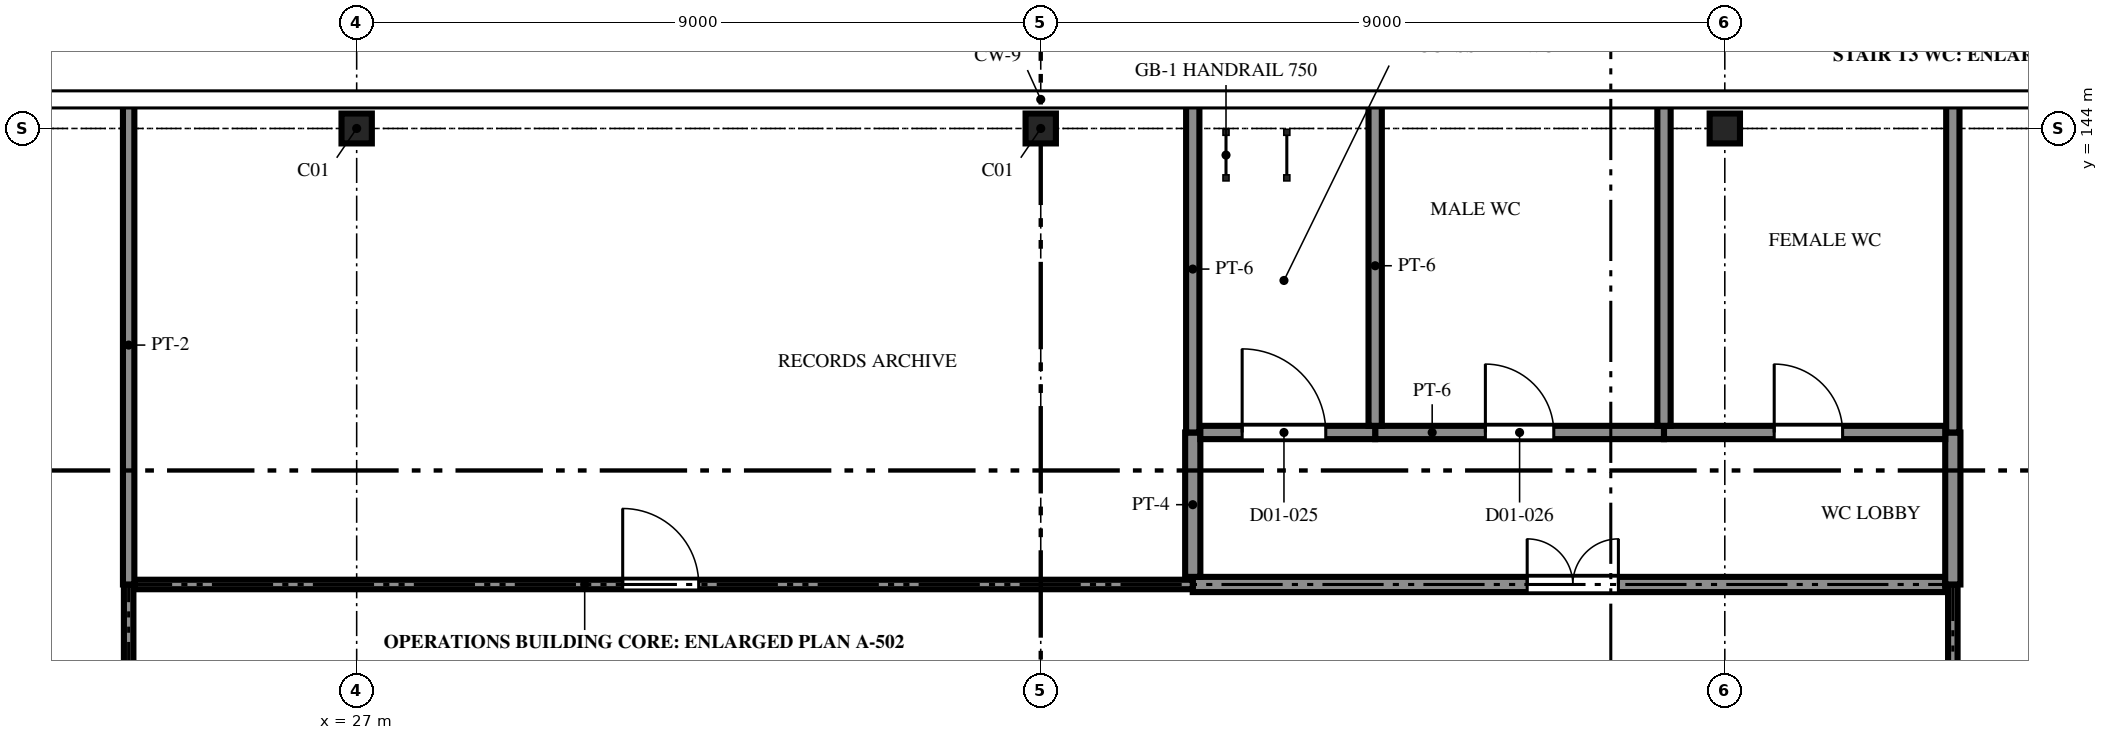
"""IFC4 building model, lengths in metres.
Left out: names, types, materials, properties, quantities, classifications, styles, units other than length and angle.
Written with IfcOpenShell. Run it as: python <this file> out.ifc"""

import sys

from ifc_helpers import new_model, si_unit, direction, frame, frame_2d, origin, origin_2d, place, context, subcontext, project, spatial, polyline, rectangle, i_section, outline, extrude, element, fill, save


model = new_model("IFC4")
c1 = context("Model", 3, precision=1e-05, world=origin(), true_north=direction((0.0, 1.0)))
c2 = subcontext(c1, "Body", "Model", "MODEL_VIEW")
j1 = project(units=[si_unit("LENGTHUNIT", "METRE"), si_unit("PLANEANGLEUNIT", "RADIAN")], contexts=[c1])
p1 = place(None, origin())
s1 = spatial("IfcSite", under=j1, at=p1, CompositionType="ELEMENT")
p2 = place(p1, origin())
s2 = spatial("IfcBuilding", under=s1, at=p2, CompositionType="ELEMENT")
p3 = place(p2, frame((0.0, 0.0, 7.5)))
s3 = spatial("IfcBuildingStorey", under=s2, at=p3, CompositionType="ELEMENT", Elevation=7.5)
for number, where, z_axis, x_axis in (
    (1, (27.0, 144.0, 0.0), (0.0, 0.0, 1.0), (1.0, 0.0, 0.0)),
    (2, (36.0, 144.0, 0.0), (0.0, 0.0, 1.0), (1.0, 0.0, 0.0)),
    (3, (45.0, 144.0, 0.0), (0.0, 0.0, 1.0), (1.0, 0.0, 0.0)),
):
    element("IfcColumn", number, at=place(p3, frame(where, z_axis=z_axis, x_axis=x_axis)), inside=s3, PredefinedType="COLUMN", context=c2, shape_type="SweptSolid", body=[
        extrude(i_section(OverallWidth=0.399, OverallDepth=0.394, WebThickness=0.016, FlangeThickness=0.025, FilletRadius=0.015, at=origin_2d()), origin(), (0.0, 0.0, 1.0), 4.2),
    ])
p4 = place(p3, frame((38.0, 138.0, 0.0), z_axis=(0.0, 0.0, 1.0), x_axis=(1.0, 0.0, 0.0)))
e4 = element("IfcWall", 4, at=p4, inside=s3, PredefinedType="PARTITIONING", context=c2, shape_type="SweptSolid", body=[
    extrude(rectangle(XDim=9.9, YDim=0.2, at=frame_2d((4.95, 0.0))), origin(), (0.0, 0.0, 1.0), 3.382),
])
p5 = place(p4, frame((4.4, 0.0, 0.0)))
e5 = element("IfcOpeningElement", 5, at=p5, cuts=e4, PredefinedType="OPENING", context=c2, shape_type="SweptSolid", body=[
    extrude(rectangle(XDim=1.2, YDim=2.1, at=frame_2d((0.6, 1.05))), frame((0.0, 0.11, 0.0), z_axis=(0.0, -1.0, 0.0), x_axis=(1.0, 0.0, 0.0)), (0.0, 0.0, 1.0), 0.22),
])
for number, where, z_axis, x_axis in (
    (6, (48.0, 138.0, 0.0), (0.0, 0.0, 1.0), (0.0, -1.0, 0.0)),
    (7, (24.0, 135.062, 0.0), (0.0, 0.0, 1.0), (0.0, 1.0, 0.0)),
):
    element("IfcWall", number, at=place(p3, frame(where, z_axis=z_axis, x_axis=x_axis)), inside=s3, PredefinedType="PARTITIONING", context=c2, shape_type="SweptSolid", body=[
        extrude(rectangle(XDim=2.938, YDim=0.125, at=frame_2d((1.469, 0.0))), origin(), (0.0, 0.0, 1.0), 3.307),
    ])
p6 = place(p3, frame((24.075, 138.0, 0.0), z_axis=(0.0, 0.0, 1.0), x_axis=(1.0, 0.0, 0.0)))
e8 = element("IfcWall", 8, at=p6, inside=s3, PredefinedType="PARTITIONING", context=c2, shape_type="SweptSolid", body=[
    extrude(rectangle(XDim=13.925, YDim=0.125, at=frame_2d((6.962, 0.0))), origin(), (0.0, 0.0, 1.0), 3.307),
])
p7 = place(p6, frame((6.425, 0.0, 0.0)))
e9 = element("IfcOpeningElement", 9, at=p7, cuts=e8, PredefinedType="OPENING", context=c2, shape_type="SweptSolid", body=[
    extrude(rectangle(XDim=1.0, YDim=2.1, at=frame_2d((0.5, 1.05))), frame((0.0, 0.073, 0.0), z_axis=(0.0, -1.0, 0.0), x_axis=(1.0, 0.0, 0.0)), (0.0, 0.0, 1.0), 0.145),
])
p8 = place(p3, frame((48.0, 140.0, 0.0), z_axis=(0.0, 0.0, 1.0), x_axis=(0.0, -1.0, 0.0)))
e10 = element("IfcWall", 10, at=p8, inside=s3, PredefinedType="PARTITIONING", context=c2, shape_type="SweptSolid", body=[
    extrude(rectangle(XDim=2.0, YDim=0.2, at=frame_2d((1.0, 0.0))), origin(), (0.0, 0.0, 1.0), 3.382),
])
p9 = place(p3, frame((38.0, 138.1, 0.0), z_axis=(0.0, 0.0, 1.0), x_axis=(0.0, 1.0, 0.0)))
e11 = element("IfcWall", 11, at=p9, inside=s3, PredefinedType="PARTITIONING", context=c2, shape_type="SweptSolid", body=[
    extrude(rectangle(XDim=1.9, YDim=0.2, at=frame_2d((0.95, 0.0))), origin(), (0.0, 0.0, 1.0), 3.382),
])
p10 = place(p3, frame((40.4, 140.0, 0.0), z_axis=(0.0, 0.0, 1.0), x_axis=(1.0, 0.0, 0.0)))
e12 = element("IfcWall", 12, at=p10, inside=s3, PredefinedType="PARTITIONING", context=c2, shape_type="SweptSolid", body=[
    extrude(rectangle(XDim=3.8, YDim=0.175, at=frame_2d((1.9, 0.0))), origin(), (0.0, 0.0, 1.0), 3.307),
])
p11 = place(p10, frame((1.45, 0.0, 0.0)))
e13 = element("IfcOpeningElement", 13, at=p11, cuts=e12, PredefinedType="OPENING", context=c2, shape_type="SweptSolid", body=[
    extrude(rectangle(XDim=0.9, YDim=2.1, at=frame_2d((0.45, 1.05))), frame((0.0, 0.097, 0.0), z_axis=(0.0, -1.0, 0.0), x_axis=(1.0, 0.0, 0.0)), (0.0, 0.0, 1.0), 0.195),
])
p12 = place(p3, frame((44.2, 140.0, 0.0), z_axis=(0.0, 0.0, 1.0), x_axis=(1.0, 0.0, 0.0)))
e14 = element("IfcWall", 14, at=p12, inside=s3, PredefinedType="PARTITIONING", context=c2, shape_type="SweptSolid", body=[
    extrude(rectangle(XDim=3.7, YDim=0.175, at=frame_2d((1.85, 0.0))), origin(), (0.0, 0.0, 1.0), 3.307),
])
p13 = place(p12, frame((1.45, 0.0, 0.0)))
e15 = element("IfcOpeningElement", 15, at=p13, cuts=e14, PredefinedType="OPENING", context=c2, shape_type="SweptSolid", body=[
    extrude(rectangle(XDim=0.9, YDim=2.1, at=frame_2d((0.45, 1.05))), frame((0.0, 0.097, 0.0), z_axis=(0.0, -1.0, 0.0), x_axis=(1.0, 0.0, 0.0)), (0.0, 0.0, 1.0), 0.195),
])
p14 = place(p3, frame((38.1, 140.0, 0.0), z_axis=(0.0, 0.0, 1.0), x_axis=(1.0, 0.0, 0.0)))
e16 = element("IfcWall", 16, at=p14, inside=s3, PredefinedType="PARTITIONING", context=c2, shape_type="SweptSolid", body=[
    extrude(rectangle(XDim=2.3, YDim=0.175, at=frame_2d((1.15, 0.0))), origin(), (0.0, 0.0, 1.0), 3.307),
])
p15 = place(p14, frame((0.55, 0.0, 0.0)))
e17 = element("IfcOpeningElement", 17, at=p15, cuts=e16, PredefinedType="OPENING", context=c2, shape_type="SweptSolid", body=[
    extrude(rectangle(XDim=1.1, YDim=2.1, at=frame_2d((0.55, 1.05))), frame((0.0, 0.097, 0.0), z_axis=(0.0, -1.0, 0.0), x_axis=(1.0, 0.0, 0.0)), (0.0, 0.0, 1.0), 0.195),
])
p16 = place(p3, frame((38.0, 140.0, 0.0), z_axis=(0.0, 0.0, 1.0), x_axis=(0.0, 1.0, 0.0)))
e18 = element("IfcWall", 18, at=p16, inside=s3, PredefinedType="PARTITIONING", context=c2, shape_type="SweptSolid", body=[
    extrude(rectangle(XDim=4.3, YDim=0.175, at=frame_2d((2.15, 0.0))), origin(), (0.0, 0.0, 1.0), 3.307),
])
for number, where, z_axis, x_axis in (
    (19, (40.4, 144.3, 0.0), (0.0, 0.0, 1.0), (0.0, -1.0, 0.0)),
    (20, (44.2, 144.3, 0.0), (0.0, 0.0, 1.0), (0.0, -1.0, 0.0)),
):
    element("IfcWall", number, at=place(p3, frame(where, z_axis=z_axis, x_axis=x_axis)), inside=s3, PredefinedType="PARTITIONING", context=c2, shape_type="SweptSolid", body=[
        extrude(rectangle(XDim=4.213, YDim=0.175, at=frame_2d((2.106, 0.0))), origin(), (0.0, 0.0, 1.0), 3.307),
    ])
p17 = place(p3, frame((48.0, 144.3, 0.0), z_axis=(0.0, 0.0, 1.0), x_axis=(0.0, -1.0, 0.0)))
e21 = element("IfcWall", 21, at=p17, inside=s3, PredefinedType="PARTITIONING", context=c2, shape_type="SweptSolid", body=[
    extrude(rectangle(XDim=4.3, YDim=0.175, at=frame_2d((2.15, 0.0))), origin(), (0.0, 0.0, 1.0), 3.307),
])
p18 = place(p3, frame((24.0, 144.3, 0.0), z_axis=(0.0, 0.0, 1.0), x_axis=(0.0, -1.0, 0.0)))
e22 = element("IfcWall", 22, at=p18, inside=s3, PredefinedType="PARTITIONING", context=c2, shape_type="SweptSolid", body=[
    extrude(rectangle(XDim=6.3, YDim=0.15, at=frame_2d((3.15, 0.0))), origin(), (0.0, 0.0, 1.0), 3.307),
])
p19 = place(p5, origin())
e23 = element("IfcDoor", 23, at=p19, inside=s3, OperationType="DOUBLE_DOOR_SINGLE_SWING", PredefinedType="DOOR", context=c2, shape_type="SweptSolid", body=[
    extrude(outline(polyline([(0.0, 0.0), (0.07, 0.0), (0.07, 2.03), (1.13, 2.03), (1.13, 0.0), (1.2, 0.0), (1.2, 2.1), (0.0, 2.1), (0.0, 0.0)])), frame((0.0, 0.025, 0.0), z_axis=(0.0, -1.0, 0.0), x_axis=(1.0, 0.0, 0.0)), (0.0, 0.0, 1.0), 0.05),
    extrude(outline(polyline([(0.074, 0.01), (0.597, 0.01), (0.597, 2.026), (0.074, 2.026), (0.074, 0.01)]), holes=[polyline([(0.178, 0.373), (0.492, 0.373), (0.492, 1.784), (0.178, 1.784), (0.178, 0.373)])]), frame((0.0, 0.017, 0.0), z_axis=(0.0, -1.0, 0.0), x_axis=(1.0, 0.0, 0.0)), (0.0, 0.0, 1.0), 0.035),
    extrude(rectangle(XDim=0.314, YDim=1.411, at=frame_2d((0.335, 1.079))), frame((0.0, 0.009, 0.0), z_axis=(0.0, -1.0, 0.0), x_axis=(1.0, 0.0, 0.0)), (0.0, 0.0, 1.0), 0.017),
    extrude(outline(polyline([(0.603, 0.01), (1.126, 0.01), (1.126, 2.026), (0.603, 2.026), (0.603, 0.01)]), holes=[polyline([(0.708, 0.373), (1.021, 0.373), (1.021, 1.784), (0.708, 1.784), (0.708, 0.373)])]), frame((0.0, 0.017, 0.0), z_axis=(0.0, -1.0, 0.0), x_axis=(1.0, 0.0, 0.0)), (0.0, 0.0, 1.0), 0.035),
    extrude(rectangle(XDim=0.314, YDim=1.411, at=frame_2d((0.865, 1.079))), frame((0.0, 0.009, 0.0), z_axis=(0.0, -1.0, 0.0), x_axis=(1.0, 0.0, 0.0)), (0.0, 0.0, 1.0), 0.017),
])
fill(e5, e23)
p20 = place(p15, origin())
e24 = element("IfcDoor", 24, at=p20, inside=s3, OperationType="SINGLE_SWING_LEFT", PredefinedType="DOOR", context=c2, shape_type="SweptSolid", body=[
    extrude(outline(polyline([(0.0, 0.0), (0.07, 0.0), (0.07, 2.03), (1.03, 2.03), (1.03, 0.0), (1.1, 0.0), (1.1, 2.1), (0.0, 2.1), (0.0, 0.0)])), frame((0.0, 0.025, 0.0), z_axis=(0.0, -1.0, 0.0), x_axis=(1.0, 0.0, 0.0)), (0.0, 0.0, 1.0), 0.05),
    extrude(outline(polyline([(0.074, 0.01), (1.026, 0.01), (1.026, 2.026), (0.074, 2.026), (0.074, 0.01)]), holes=[polyline([(0.194, 0.16), (0.906, 0.16), (0.906, 1.01), (0.194, 1.01), (0.194, 0.16)]), polyline([(0.4, 1.16), (0.7, 1.16), (0.7, 1.76), (0.4, 1.76), (0.4, 1.16)])]), frame((0.0, 0.017, 0.0), z_axis=(0.0, -1.0, 0.0), x_axis=(1.0, 0.0, 0.0)), (0.0, 0.0, 1.0), 0.035),
    extrude(rectangle(XDim=0.712, YDim=0.85, at=frame_2d((0.55, 0.585))), frame((0.0, 0.009, 0.0), z_axis=(0.0, -1.0, 0.0), x_axis=(1.0, 0.0, 0.0)), (0.0, 0.0, 1.0), 0.017),
    extrude(rectangle(XDim=0.3, YDim=0.6, at=frame_2d((0.55, 1.46))), frame((0.0, 0.006, 0.0), z_axis=(0.0, -1.0, 0.0), x_axis=(1.0, 0.0, 0.0)), (0.0, 0.0, 1.0), 0.012),
])
fill(e17, e24)
p21 = place(p11, origin())
e25 = element("IfcDoor", 25, at=p21, inside=s3, OperationType="SINGLE_SWING_LEFT", PredefinedType="DOOR", context=c2, shape_type="SweptSolid", body=[
    extrude(outline(polyline([(0.0, 0.0), (0.07, 0.0), (0.07, 2.03), (0.83, 2.03), (0.83, 0.0), (0.9, 0.0), (0.9, 2.1), (0.0, 2.1), (0.0, 0.0)])), frame((0.0, 0.025, 0.0), z_axis=(0.0, -1.0, 0.0), x_axis=(1.0, 0.0, 0.0)), (0.0, 0.0, 1.0), 0.05),
    extrude(outline(polyline([(0.074, 0.01), (0.826, 0.01), (0.826, 2.026), (0.074, 2.026), (0.074, 0.01)]), holes=[polyline([(0.194, 0.16), (0.706, 0.16), (0.706, 1.01), (0.194, 1.01), (0.194, 0.16)]), polyline([(0.3, 1.16), (0.6, 1.16), (0.6, 1.76), (0.3, 1.76), (0.3, 1.16)])]), frame((0.0, 0.017, 0.0), z_axis=(0.0, -1.0, 0.0), x_axis=(1.0, 0.0, 0.0)), (0.0, 0.0, 1.0), 0.035),
    extrude(rectangle(XDim=0.512, YDim=0.85, at=frame_2d((0.45, 0.585))), frame((0.0, 0.009, 0.0), z_axis=(0.0, -1.0, 0.0), x_axis=(1.0, 0.0, 0.0)), (0.0, 0.0, 1.0), 0.017),
    extrude(rectangle(XDim=0.3, YDim=0.6, at=frame_2d((0.45, 1.46))), frame((0.0, 0.006, 0.0), z_axis=(0.0, -1.0, 0.0), x_axis=(1.0, 0.0, 0.0)), (0.0, 0.0, 1.0), 0.012),
])
fill(e13, e25)
p22 = place(p13, origin())
e26 = element("IfcDoor", 26, at=p22, inside=s3, OperationType="SINGLE_SWING_LEFT", PredefinedType="DOOR", context=c2, shape_type="SweptSolid", body=[
    extrude(outline(polyline([(0.0, 0.0), (0.07, 0.0), (0.07, 2.03), (0.83, 2.03), (0.83, 0.0), (0.9, 0.0), (0.9, 2.1), (0.0, 2.1), (0.0, 0.0)])), frame((0.0, 0.025, 0.0), z_axis=(0.0, -1.0, 0.0), x_axis=(1.0, 0.0, 0.0)), (0.0, 0.0, 1.0), 0.05),
    extrude(outline(polyline([(0.074, 0.01), (0.826, 0.01), (0.826, 2.026), (0.074, 2.026), (0.074, 0.01)]), holes=[polyline([(0.194, 0.16), (0.706, 0.16), (0.706, 1.01), (0.194, 1.01), (0.194, 0.16)]), polyline([(0.3, 1.16), (0.6, 1.16), (0.6, 1.76), (0.3, 1.76), (0.3, 1.16)])]), frame((0.0, 0.017, 0.0), z_axis=(0.0, -1.0, 0.0), x_axis=(1.0, 0.0, 0.0)), (0.0, 0.0, 1.0), 0.035),
    extrude(rectangle(XDim=0.512, YDim=0.85, at=frame_2d((0.45, 0.585))), frame((0.0, 0.009, 0.0), z_axis=(0.0, -1.0, 0.0), x_axis=(1.0, 0.0, 0.0)), (0.0, 0.0, 1.0), 0.017),
    extrude(rectangle(XDim=0.3, YDim=0.6, at=frame_2d((0.45, 1.46))), frame((0.0, 0.006, 0.0), z_axis=(0.0, -1.0, 0.0), x_axis=(1.0, 0.0, 0.0)), (0.0, 0.0, 1.0), 0.012),
])
fill(e15, e26)
p23 = place(p7, origin())
e27 = element("IfcDoor", 27, at=p23, inside=s3, OperationType="SINGLE_SWING_LEFT", PredefinedType="DOOR", context=c2, shape_type="SweptSolid", body=[
    extrude(outline(polyline([(0.0, 0.0), (0.07, 0.0), (0.07, 2.03), (0.93, 2.03), (0.93, 0.0), (1.0, 0.0), (1.0, 2.1), (0.0, 2.1), (0.0, 0.0)])), frame((0.0, 0.025, 0.0), z_axis=(0.0, -1.0, 0.0), x_axis=(1.0, 0.0, 0.0)), (0.0, 0.0, 1.0), 0.05),
    extrude(outline(polyline([(0.074, 0.01), (0.926, 0.01), (0.926, 2.026), (0.074, 2.026), (0.074, 0.01)]), holes=[polyline([(0.194, 0.16), (0.806, 0.16), (0.806, 1.01), (0.194, 1.01), (0.194, 0.16)]), polyline([(0.35, 1.16), (0.65, 1.16), (0.65, 1.76), (0.35, 1.76), (0.35, 1.16)])]), frame((0.0, 0.017, 0.0), z_axis=(0.0, -1.0, 0.0), x_axis=(1.0, 0.0, 0.0)), (0.0, 0.0, 1.0), 0.035),
    extrude(rectangle(XDim=0.612, YDim=0.85, at=frame_2d((0.5, 0.585))), frame((0.0, 0.009, 0.0), z_axis=(0.0, -1.0, 0.0), x_axis=(1.0, 0.0, 0.0)), (0.0, 0.0, 1.0), 0.017),
    extrude(rectangle(XDim=0.3, YDim=0.6, at=frame_2d((0.5, 1.46))), frame((0.0, 0.006, 0.0), z_axis=(0.0, -1.0, 0.0), x_axis=(1.0, 0.0, 0.0)), (0.0, 0.0, 1.0), 0.012),
])
fill(e9, e27)
save(model, sys.argv[1])
